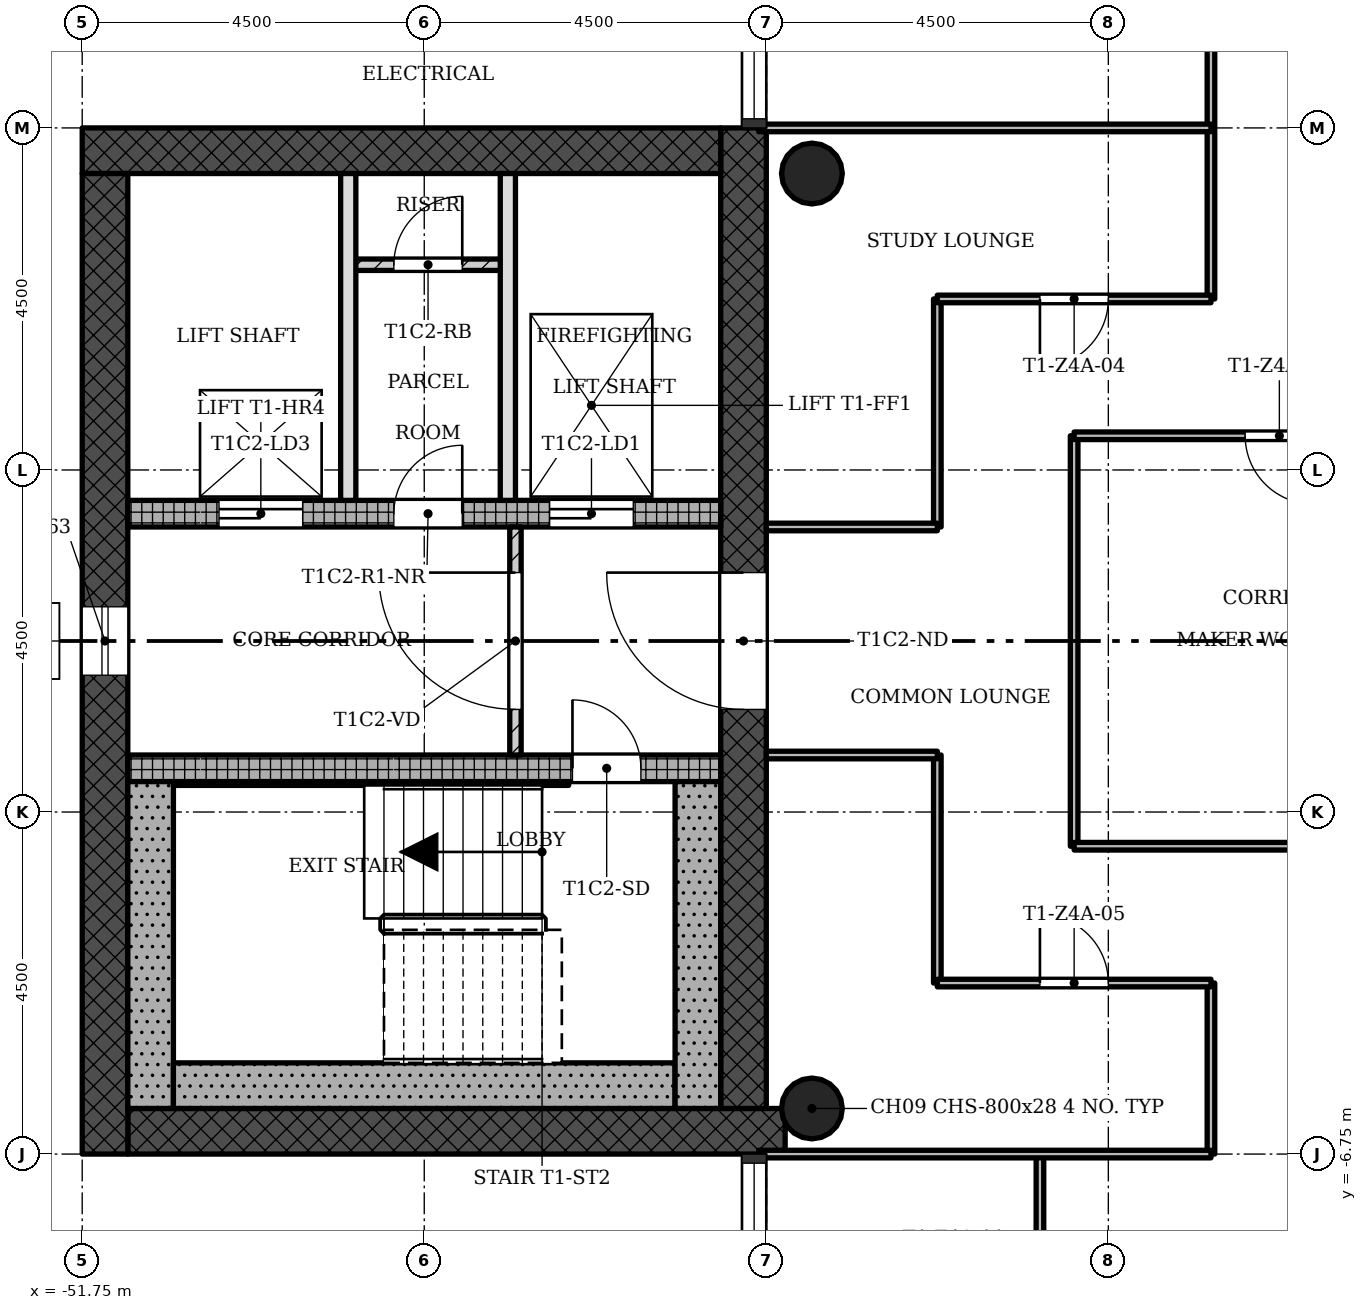
"""IFC4 building model, lengths in metres.
Left out: names, types, materials, properties, quantities, classifications, styles, units other than length and angle.
Written with IfcOpenShell. Run it as: python <this file> out.ifc"""

import sys

from ifc_helpers import new_model, si_unit, direction, frame, frame_2d, origin, origin_2d, place, context, subcontext, project, spatial, rectangle, hollow_circle, extrude, element, fill, save


model = new_model("IFC4")
c1 = context("Model", 3, precision=1e-05, world=origin(), true_north=direction((0.0, 1.0)))
c2 = subcontext(c1, "Body", "Model", "MODEL_VIEW")
j1 = project(units=[si_unit("LENGTHUNIT", "METRE"), si_unit("PLANEANGLEUNIT", "RADIAN")], contexts=[c1])
p1 = place(None, origin())
s1 = spatial("IfcSite", under=j1, at=p1, CompositionType="ELEMENT")
p2 = place(p1, origin())
s2 = spatial("IfcBuilding", under=s1, at=p2, CompositionType="ELEMENT")
p3 = place(p2, frame((0.0, 0.0, 226.6)))
s3 = spatial("IfcBuildingStorey", under=s2, at=p3, CompositionType="ELEMENT", Elevation=226.6)
p4 = place(p3, frame((-51.15, -6.45, 0.0), z_axis=(0.0, 0.0, 1.0), x_axis=(1.0, 0.0, 0.0)))
e1 = element("IfcWall", 1, at=p4, inside=s3, PredefinedType="SHEAR", context=c2, shape_type="SweptSolid", body=[
    extrude(rectangle(XDim=8.648, YDim=0.6, at=frame_2d((4.324, 0.0))), origin(), (0.0, 0.0, 1.0), 3.4),
])
p5 = place(p3, frame((-43.05, -6.15, 0.0), z_axis=(0.0, 0.0, 1.0), x_axis=(0.0, 1.0, 0.0)))
e2 = element("IfcWall", 2, at=p5, inside=s3, PredefinedType="SHEAR", context=c2, shape_type="SweptSolid", body=[
    extrude(rectangle(XDim=12.9, YDim=0.6, at=frame_2d((6.45, 0.0))), origin(), (0.0, 0.0, 1.0), 3.4),
])
p6 = place(p5, frame((5.25, 0.0, 0.0)))
e3 = element("IfcOpeningElement", 3, at=p6, cuts=e2, PredefinedType="OPENING", context=c2, shape_type="SweptSolid", body=[
    extrude(rectangle(XDim=1.8, YDim=2.1, at=frame_2d((0.9, 1.05))), frame((0.0, 0.31, 0.0), z_axis=(0.0, -1.0, 0.0), x_axis=(1.0, 0.0, 0.0)), (0.0, 0.0, 1.0), 0.62),
])
p7 = place(p3, frame((-43.35, 6.45, 0.0), z_axis=(0.0, 0.0, 1.0), x_axis=(-1.0, 0.0, 0.0)))
e4 = element("IfcWall", 4, at=p7, inside=s3, PredefinedType="SHEAR", context=c2, shape_type="SweptSolid", body=[
    extrude(rectangle(XDim=8.4, YDim=0.6, at=frame_2d((4.2, 0.0))), origin(), (0.0, 0.0, 1.0), 3.4),
])
p8 = place(p3, frame((-51.45, 6.15, 0.0), z_axis=(0.0, 0.0, 1.0), x_axis=(0.0, -1.0, 0.0)))
e5 = element("IfcWall", 5, at=p8, inside=s3, PredefinedType="SHEAR", context=c2, shape_type="SweptSolid", body=[
    extrude(rectangle(XDim=12.9, YDim=0.6, at=frame_2d((6.45, 0.0))), origin(), (0.0, 0.0, 1.0), 3.4),
])
p9 = place(p8, frame((5.7, 0.0, 0.45)))
e6 = element("IfcOpeningElement", 6, at=p9, cuts=e5, PredefinedType="OPENING", context=c2, shape_type="SweptSolid", body=[
    extrude(rectangle(XDim=0.9, YDim=2.4, at=frame_2d((0.45, 1.2))), frame((0.0, 0.31, 0.0), z_axis=(0.0, -1.0, 0.0), x_axis=(1.0, 0.0, 0.0)), (0.0, 0.0, 1.0), 0.62),
])
p10 = place(p3, frame((-51.15, -1.675, 0.0), z_axis=(0.0, 0.0, 1.0), x_axis=(1.0, 0.0, 0.0)))
e7 = element("IfcWall", 7, at=p10, inside=s3, PredefinedType="SHEAR", context=c2, shape_type="SweptSolid", body=[
    extrude(rectangle(XDim=7.8, YDim=0.35, at=frame_2d((3.9, 0.0))), origin(), (0.0, 0.0, 1.0), 3.4),
])
p11 = place(p10, frame((5.85, 0.0, 0.0)))
e8 = element("IfcOpeningElement", 8, at=p11, cuts=e7, PredefinedType="OPENING", context=c2, shape_type="SweptSolid", body=[
    extrude(rectangle(XDim=0.9, YDim=2.1, at=frame_2d((0.45, 1.05))), frame((0.0, 0.185, 0.0), z_axis=(0.0, -1.0, 0.0), x_axis=(1.0, 0.0, 0.0)), (0.0, 0.0, 1.0), 0.37),
])
p12 = place(p3, frame((-51.15, 1.675, 0.0), z_axis=(0.0, 0.0, 1.0), x_axis=(1.0, 0.0, 0.0)))
e9 = element("IfcWall", 9, at=p12, inside=s3, PredefinedType="SHEAR", context=c2, shape_type="SweptSolid", body=[
    extrude(rectangle(XDim=7.8, YDim=0.35, at=frame_2d((3.9, 0.0))), origin(), (0.0, 0.0, 1.0), 3.4),
])
p13 = place(p12, frame((5.55, 0.0, 0.0)))
e10 = element("IfcOpeningElement", 10, at=p13, cuts=e9, PredefinedType="OPENING", context=c2, shape_type="SweptSolid", body=[
    extrude(rectangle(XDim=1.1, YDim=2.1, at=frame_2d((0.55, 1.05))), frame((0.0, 0.185, 0.0), z_axis=(0.0, -1.0, 0.0), x_axis=(1.0, 0.0, 0.0)), (0.0, 0.0, 1.0), 0.37),
])
p14 = place(p12, frame((1.2, 0.0, 0.0)))
e11 = element("IfcOpeningElement", 11, at=p14, cuts=e9, PredefinedType="OPENING", context=c2, shape_type="SweptSolid", body=[
    extrude(rectangle(XDim=1.1, YDim=2.1, at=frame_2d((0.55, 1.05))), frame((0.0, 0.185, 0.0), z_axis=(0.0, -1.0, 0.0), x_axis=(1.0, 0.0, 0.0)), (0.0, 0.0, 1.0), 0.37),
])
p15 = place(p12, frame((3.5, 0.0, 0.0)))
e12 = element("IfcOpeningElement", 12, at=p15, cuts=e9, PredefinedType="OPENING", context=c2, shape_type="SweptSolid", body=[
    extrude(rectangle(XDim=0.9, YDim=2.1, at=frame_2d((0.45, 1.05))), frame((0.0, 0.185, 0.0), z_axis=(0.0, -1.0, 0.0), x_axis=(1.0, 0.0, 0.0)), (0.0, 0.0, 1.0), 0.37),
])
for number, where, z_axis, x_axis in (
    (13, (-42.15, -6.15, 0.0), (0.0, 0.0, 1.0), (1.0, 0.0, 0.0)),
    (14, (-42.15, 6.15, 0.0), (0.0, 0.0, 1.0), (1.0, 0.0, 0.0)),
):
    element("IfcColumn", number, at=place(p3, frame(where, z_axis=z_axis, x_axis=x_axis)), inside=s3, PredefinedType="COLUMN", context=c2, shape_type="SweptSolid", body=[
        extrude(hollow_circle(Radius=0.4, WallThickness=0.028, at=origin_2d()), origin(), (0.0, 0.0, 1.0), 3.4),
    ])
p16 = place(p3, frame((-46.05, 1.5, 0.0), z_axis=(0.0, 0.0, 1.0), x_axis=(0.0, -1.0, 0.0)))
e15 = element("IfcWall", 15, at=p16, inside=s3, PredefinedType="PARTITIONING", context=c2, shape_type="SweptSolid", body=[
    extrude(rectangle(XDim=3.0, YDim=0.15, at=frame_2d((1.5, 0.0))), origin(), (0.0, 0.0, 1.0), 3.0),
])
p17 = place(p16, frame((0.6, 0.0, 0.0)))
e16 = element("IfcOpeningElement", 16, at=p17, cuts=e15, PredefinedType="OPENING", context=c2, shape_type="SweptSolid", body=[
    extrude(rectangle(XDim=1.8, YDim=2.1, at=frame_2d((0.9, 1.05))), frame((0.0, 0.085, 0.0), z_axis=(0.0, -1.0, 0.0), x_axis=(1.0, 0.0, 0.0)), (0.0, 0.0, 1.0), 0.17),
])
for number, where, z_axis, x_axis in (
    (17, (-48.25, 6.15, 0.0), (0.0, 0.0, 1.0), (0.0, -1.0, 0.0)),
    (18, (-46.15, 6.15, 0.0), (0.0, 0.0, 1.0), (0.0, -1.0, 0.0)),
):
    element("IfcWall", number, at=place(p3, frame(where, z_axis=z_axis, x_axis=x_axis)), inside=s3, PredefinedType="SOLIDWALL", context=c2, shape_type="SweptSolid", body=[
        extrude(rectangle(XDim=4.3, YDim=0.2, at=frame_2d((2.15, 0.0))), origin(), (0.0, 0.0, 1.0), 3.0),
    ])
p18 = place(p3, frame((-46.15, 4.95, 0.0), z_axis=(0.0, 0.0, 1.0), x_axis=(-1.0, 0.0, 0.0)))
e19 = element("IfcWall", 19, at=p18, inside=s3, PredefinedType="PARTITIONING", context=c2, shape_type="SweptSolid", body=[
    extrude(rectangle(XDim=2.1, YDim=0.15, at=frame_2d((1.05, 0.0))), origin(), (0.0, 0.0, 1.0), 3.0),
])
p19 = place(p18, frame((0.6, 0.0, 0.0)))
e20 = element("IfcOpeningElement", 20, at=p19, cuts=e19, PredefinedType="OPENING", context=c2, shape_type="SweptSolid", body=[
    extrude(rectangle(XDim=0.9, YDim=2.1, at=frame_2d((0.45, 1.05))), frame((0.0, 0.085, 0.0), z_axis=(0.0, -1.0, 0.0), x_axis=(1.0, 0.0, 0.0)), (0.0, 0.0, 1.0), 0.17),
])
for number, where, z_axis, x_axis in (
    (21, (-40.5, -4.5, 0.0), (0.0, 0.0, 1.0), (0.0, 1.0, 0.0)),
    (22, (-40.5, 1.5, 0.0), (0.0, 0.0, 1.0), (0.0, 1.0, 0.0)),
):
    element("IfcWall", number, at=place(p3, frame(where, z_axis=z_axis, x_axis=x_axis)), inside=s3, PredefinedType="PARTITIONING", context=c2, shape_type="SweptSolid", body=[
        extrude(rectangle(XDim=3.0, YDim=0.1, at=frame_2d((1.5, 0.0))), origin(), (0.0, 0.0, 1.0), 3.0),
    ])
p20 = place(p3, frame((-39.15, -11.25, 0.0), z_axis=(0.0, 0.0, 1.0), x_axis=(0.0, 1.0, 0.0)))
e23 = element("IfcWall", 23, at=p20, inside=s3, PredefinedType="PARTITIONING", context=c2, shape_type="SweptSolid", body=[
    extrude(rectangle(XDim=4.5, YDim=0.1, at=frame_2d((2.25, 0.0))), origin(), (0.0, 0.0, 1.0), 3.0),
])
p21 = place(p20, frame((1.8, 0.0, 0.0)))
e24 = element("IfcOpeningElement", 24, at=p21, cuts=e23, PredefinedType="OPENING", context=c2, shape_type="SweptSolid", body=[
    extrude(rectangle(XDim=0.9, YDim=2.1, at=frame_2d((0.45, 1.05))), frame((0.0, 0.06, 0.0), z_axis=(0.0, -1.0, 0.0), x_axis=(1.0, 0.0, 0.0)), (0.0, 0.0, 1.0), 0.12),
])
p22 = place(p3, frame((-38.7, -2.7, 0.0), z_axis=(0.0, 0.0, 1.0), x_axis=(0.0, 1.0, 0.0)))
e25 = element("IfcWall", 25, at=p22, inside=s3, PredefinedType="PARTITIONING", context=c2, shape_type="SweptSolid", body=[
    extrude(rectangle(XDim=5.4, YDim=0.1, at=frame_2d((2.7, 0.0))), origin(), (0.0, 0.0, 1.0), 3.0),
])
p23 = place(p3, frame((-36.9, -6.75, 0.0), z_axis=(0.0, 0.0, 1.0), x_axis=(0.0, 1.0, 0.0)))
e26 = element("IfcWall", 26, at=p23, inside=s3, PredefinedType="PARTITIONING", context=c2, shape_type="SweptSolid", body=[
    extrude(rectangle(XDim=2.25, YDim=0.1, at=frame_2d((1.125, 0.0))), origin(), (0.0, 0.0, 1.0), 3.0),
])
p24 = place(p3, frame((-36.9, 4.5, 0.0), z_axis=(0.0, 0.0, 1.0), x_axis=(0.0, 1.0, 0.0)))
e27 = element("IfcWall", 27, at=p24, inside=s3, PredefinedType="PARTITIONING", context=c2, shape_type="SweptSolid", body=[
    extrude(rectangle(XDim=6.75, YDim=0.1, at=frame_2d((3.375, 0.0))), origin(), (0.0, 0.0, 1.0), 3.0),
])
p25 = place(p24, frame((4.05, 0.0, 0.0)))
e28 = element("IfcOpeningElement", 28, at=p25, cuts=e27, PredefinedType="OPENING", context=c2, shape_type="SweptSolid", body=[
    extrude(rectangle(XDim=0.9, YDim=2.1, at=frame_2d((0.45, 1.05))), frame((0.0, 0.06, 0.0), z_axis=(0.0, -1.0, 0.0), x_axis=(1.0, 0.0, 0.0)), (0.0, 0.0, 1.0), 0.12),
])
p26 = place(p3, frame((-42.85, -6.75, 0.0), z_axis=(0.0, 0.0, 1.0), x_axis=(1.0, 0.0, 0.0)))
e29 = element("IfcWall", 29, at=p26, inside=s3, PredefinedType="PARTITIONING", context=c2, shape_type="SweptSolid", body=[
    extrude(rectangle(XDim=5.95, YDim=0.1, at=frame_2d((2.975, 0.0))), origin(), (0.0, 0.0, 1.0), 3.0),
])
p27 = place(p3, frame((-40.5, -4.5, 0.0), z_axis=(0.0, 0.0, 1.0), x_axis=(1.0, 0.0, 0.0)))
e30 = element("IfcWall", 30, at=p27, inside=s3, PredefinedType="PARTITIONING", context=c2, shape_type="SweptSolid", body=[
    extrude(rectangle(XDim=3.6, YDim=0.1, at=frame_2d((1.8, 0.0))), origin(), (0.0, 0.0, 1.0), 3.0),
])
p28 = place(p27, frame((1.35, 0.0, 0.0)))
e31 = element("IfcOpeningElement", 31, at=p28, cuts=e30, PredefinedType="OPENING", context=c2, shape_type="SweptSolid", body=[
    extrude(rectangle(XDim=0.9, YDim=2.1, at=frame_2d((0.45, 1.05))), frame((0.0, 0.06, 0.0), z_axis=(0.0, -1.0, 0.0), x_axis=(1.0, 0.0, 0.0)), (0.0, 0.0, 1.0), 0.12),
])
p29 = place(p3, frame((-38.7, -2.7, 0.0), z_axis=(0.0, 0.0, 1.0), x_axis=(1.0, 0.0, 0.0)))
e32 = element("IfcWall", 32, at=p29, inside=s3, PredefinedType="PARTITIONING", context=c2, shape_type="SweptSolid", body=[
    extrude(rectangle(XDim=5.4, YDim=0.1, at=frame_2d((2.7, 0.0))), origin(), (0.0, 0.0, 1.0), 3.0),
])
for number, where, z_axis, x_axis in (
    (33, (-42.75, -1.5, 0.0), (0.0, 0.0, 1.0), (1.0, 0.0, 0.0)),
    (34, (-42.75, 1.5, 0.0), (0.0, 0.0, 1.0), (1.0, 0.0, 0.0)),
):
    element("IfcWall", number, at=place(p3, frame(where, z_axis=z_axis, x_axis=x_axis)), inside=s3, PredefinedType="PARTITIONING", context=c2, shape_type="SweptSolid", body=[
        extrude(rectangle(XDim=2.25, YDim=0.1, at=frame_2d((1.125, 0.0))), origin(), (0.0, 0.0, 1.0), 3.0),
    ])
p30 = place(p3, frame((-38.7, 2.7, 0.0), z_axis=(0.0, 0.0, 1.0), x_axis=(1.0, 0.0, 0.0)))
e35 = element("IfcWall", 35, at=p30, inside=s3, PredefinedType="PARTITIONING", context=c2, shape_type="SweptSolid", body=[
    extrude(rectangle(XDim=5.4, YDim=0.1, at=frame_2d((2.7, 0.0))), origin(), (0.0, 0.0, 1.0), 3.0),
])
p31 = place(p30, frame((2.25, 0.0, 0.0)))
e36 = element("IfcOpeningElement", 36, at=p31, cuts=e35, PredefinedType="OPENING", context=c2, shape_type="SweptSolid", body=[
    extrude(rectangle(XDim=0.9, YDim=2.1, at=frame_2d((0.45, 1.05))), frame((0.0, 0.06, 0.0), z_axis=(0.0, -1.0, 0.0), x_axis=(1.0, 0.0, 0.0)), (0.0, 0.0, 1.0), 0.12),
])
p32 = place(p3, frame((-40.5, 4.5, 0.0), z_axis=(0.0, 0.0, 1.0), x_axis=(1.0, 0.0, 0.0)))
e37 = element("IfcWall", 37, at=p32, inside=s3, PredefinedType="PARTITIONING", context=c2, shape_type="SweptSolid", body=[
    extrude(rectangle(XDim=3.6, YDim=0.1, at=frame_2d((1.8, 0.0))), origin(), (0.0, 0.0, 1.0), 3.0),
])
p33 = place(p32, frame((1.35, 0.0, 0.0)))
e38 = element("IfcOpeningElement", 38, at=p33, cuts=e37, PredefinedType="OPENING", context=c2, shape_type="SweptSolid", body=[
    extrude(rectangle(XDim=0.9, YDim=2.1, at=frame_2d((0.45, 1.05))), frame((0.0, 0.06, 0.0), z_axis=(0.0, -1.0, 0.0), x_axis=(1.0, 0.0, 0.0)), (0.0, 0.0, 1.0), 0.12),
])
p34 = place(p3, frame((-42.85, 6.75, 0.0), z_axis=(0.0, 0.0, 1.0), x_axis=(1.0, 0.0, 0.0)))
e39 = element("IfcWall", 39, at=p34, inside=s3, PredefinedType="PARTITIONING", context=c2, shape_type="SweptSolid", body=[
    extrude(rectangle(XDim=5.95, YDim=0.1, at=frame_2d((2.975, 0.0))), origin(), (0.0, 0.0, 1.0), 3.0),
])
p35 = place(p3, frame((-50.85, -1.85, 0.0), z_axis=(0.0, 0.0, 1.0), x_axis=(0.0, -1.0, 0.0)))
e40 = element("IfcWall", 40, at=p35, inside=s3, PredefinedType="SHEAR", context=c2, shape_type="SweptSolid", body=[
    extrude(rectangle(XDim=4.3, YDim=0.6, at=frame_2d((2.15, 0.0))), origin(), (0.0, 0.0, 1.0), 3.4),
])
p36 = place(p3, frame((-43.95, -5.85, 0.0), z_axis=(0.0, 0.0, 1.0), x_axis=(-1.0, 0.0, 0.0)))
e41 = element("IfcWall", 41, at=p36, inside=s3, PredefinedType="SHEAR", context=c2, shape_type="SweptSolid", body=[
    extrude(rectangle(XDim=6.6, YDim=0.6, at=frame_2d((3.3, 0.0))), origin(), (0.0, 0.0, 1.0), 3.4),
])
p37 = place(p3, frame((-43.65, -1.85, 0.0), z_axis=(0.0, 0.0, 1.0), x_axis=(0.0, -1.0, 0.0)))
e42 = element("IfcWall", 42, at=p37, inside=s3, PredefinedType="SHEAR", context=c2, shape_type="SweptSolid", body=[
    extrude(rectangle(XDim=4.3, YDim=0.6, at=frame_2d((2.15, 0.0))), origin(), (0.0, 0.0, 1.0), 3.4),
])
p38 = place(p3, frame((-45.35, -1.875, 0.0), z_axis=(0.0, 0.0, 1.0), x_axis=(-1.0, 0.0, 0.0)))
e43 = element("IfcWall", 43, at=p38, inside=s3, PredefinedType="SHEAR", context=c2, shape_type="SweptSolid", body=[
    extrude(rectangle(XDim=5.2, YDim=0.05, at=frame_2d((2.6, 0.0))), origin(), (0.0, 0.0, 1.0), 3.4),
])
p39 = place(p9, origin())
e44 = element("IfcWindow", 44, at=p39, inside=s3, PartitioningType="SINGLE_PANEL", PredefinedType="WINDOW", context=c2, shape_type="SweptSolid", body=[
    extrude(rectangle(XDim=0.9, YDim=2.4, at=frame_2d((0.45, 1.2))), frame((0.0, 0.03, 0.0), z_axis=(0.0, -1.0, 0.0), x_axis=(1.0, 0.0, 0.0)), (0.0, 0.0, 1.0), 0.06),
])
fill(e6, e44)
p40 = place(p17, origin())
e45 = element("IfcDoor", 45, at=p40, inside=s3, OperationType="SINGLE_SWING_LEFT", PredefinedType="DOOR", context=c2, shape_type="SweptSolid", body=[
    extrude(rectangle(XDim=1.8, YDim=2.1, at=frame_2d((0.9, 1.05))), frame((0.0, 0.025, 0.0), z_axis=(0.0, -1.0, 0.0), x_axis=(1.0, 0.0, 0.0)), (0.0, 0.0, 1.0), 0.05),
])
fill(e16, e45)
p41 = place(p19, origin())
e46 = element("IfcDoor", 46, at=p41, inside=s3, OperationType="SINGLE_SWING_LEFT", PredefinedType="DOOR", context=c2, shape_type="SweptSolid", body=[
    extrude(rectangle(XDim=0.9, YDim=2.1, at=frame_2d((0.45, 1.05))), frame((0.0, 0.025, 0.0), z_axis=(0.0, -1.0, 0.0), x_axis=(1.0, 0.0, 0.0)), (0.0, 0.0, 1.0), 0.05),
])
fill(e20, e46)
p42 = place(p31, origin())
e47 = element("IfcDoor", 47, at=p42, inside=s3, OperationType="SINGLE_SWING_RIGHT", PredefinedType="DOOR", context=c2, shape_type="SweptSolid", body=[
    extrude(rectangle(XDim=0.9, YDim=2.1, at=frame_2d((0.45, 1.05))), frame((0.0, 0.025, 0.0), z_axis=(0.0, -1.0, 0.0), x_axis=(1.0, 0.0, 0.0)), (0.0, 0.0, 1.0), 0.05),
])
fill(e36, e47)
p43 = place(p33, origin())
e48 = element("IfcDoor", 48, at=p43, inside=s3, OperationType="SINGLE_SWING_LEFT", PredefinedType="DOOR", context=c2, shape_type="SweptSolid", body=[
    extrude(rectangle(XDim=0.9, YDim=2.1, at=frame_2d((0.45, 1.05))), frame((0.0, 0.025, 0.0), z_axis=(0.0, -1.0, 0.0), x_axis=(1.0, 0.0, 0.0)), (0.0, 0.0, 1.0), 0.05),
])
fill(e38, e48)
p44 = place(p28, origin())
e49 = element("IfcDoor", 49, at=p44, inside=s3, OperationType="SINGLE_SWING_RIGHT", PredefinedType="DOOR", context=c2, shape_type="SweptSolid", body=[
    extrude(rectangle(XDim=0.9, YDim=2.1, at=frame_2d((0.45, 1.05))), frame((0.0, 0.025, 0.0), z_axis=(0.0, -1.0, 0.0), x_axis=(1.0, 0.0, 0.0)), (0.0, 0.0, 1.0), 0.05),
])
fill(e31, e49)
p45 = place(p11, origin())
e50 = element("IfcDoor", 50, at=p45, inside=s3, OperationType="SINGLE_SWING_RIGHT", PredefinedType="DOOR", context=c2, shape_type="SweptSolid", body=[
    extrude(rectangle(XDim=0.9, YDim=2.1, at=frame_2d((0.45, 1.05))), frame((0.0, 0.025, 0.0), z_axis=(0.0, -1.0, 0.0), x_axis=(1.0, 0.0, 0.0)), (0.0, 0.0, 1.0), 0.05),
])
fill(e8, e50)
p46 = place(p13, origin())
e51 = element("IfcDoor", 51, at=p46, inside=s3, OperationType="SLIDING_TO_LEFT", PredefinedType="DOOR", context=c2, shape_type="SweptSolid", body=[
    extrude(rectangle(XDim=1.1, YDim=2.1, at=frame_2d((0.55, 1.05))), frame((0.0, 0.025, 0.0), z_axis=(0.0, -1.0, 0.0), x_axis=(1.0, 0.0, 0.0)), (0.0, 0.0, 1.0), 0.05),
])
fill(e10, e51)
p47 = place(p14, origin())
e52 = element("IfcDoor", 52, at=p47, inside=s3, OperationType="SLIDING_TO_LEFT", PredefinedType="DOOR", context=c2, shape_type="SweptSolid", body=[
    extrude(rectangle(XDim=1.1, YDim=2.1, at=frame_2d((0.55, 1.05))), frame((0.0, 0.025, 0.0), z_axis=(0.0, -1.0, 0.0), x_axis=(1.0, 0.0, 0.0)), (0.0, 0.0, 1.0), 0.05),
])
fill(e11, e52)
p48 = place(p15, origin())
e53 = element("IfcDoor", 53, at=p48, inside=s3, OperationType="SINGLE_SWING_LEFT", PredefinedType="DOOR", context=c2, shape_type="SweptSolid", body=[
    extrude(rectangle(XDim=0.9, YDim=2.1, at=frame_2d((0.45, 1.05))), frame((0.0, 0.025, 0.0), z_axis=(0.0, -1.0, 0.0), x_axis=(1.0, 0.0, 0.0)), (0.0, 0.0, 1.0), 0.05),
])
fill(e12, e53)
p49 = place(p6, origin())
e54 = element("IfcDoor", 54, at=p49, inside=s3, OperationType="SINGLE_SWING_LEFT", PredefinedType="DOOR", context=c2, shape_type="SweptSolid", body=[
    extrude(rectangle(XDim=1.8, YDim=2.1, at=frame_2d((0.9, 1.05))), frame((0.0, 0.025, 0.0), z_axis=(0.0, -1.0, 0.0), x_axis=(1.0, 0.0, 0.0)), (0.0, 0.0, 1.0), 0.05),
])
fill(e3, e54)
save(model, sys.argv[1])
